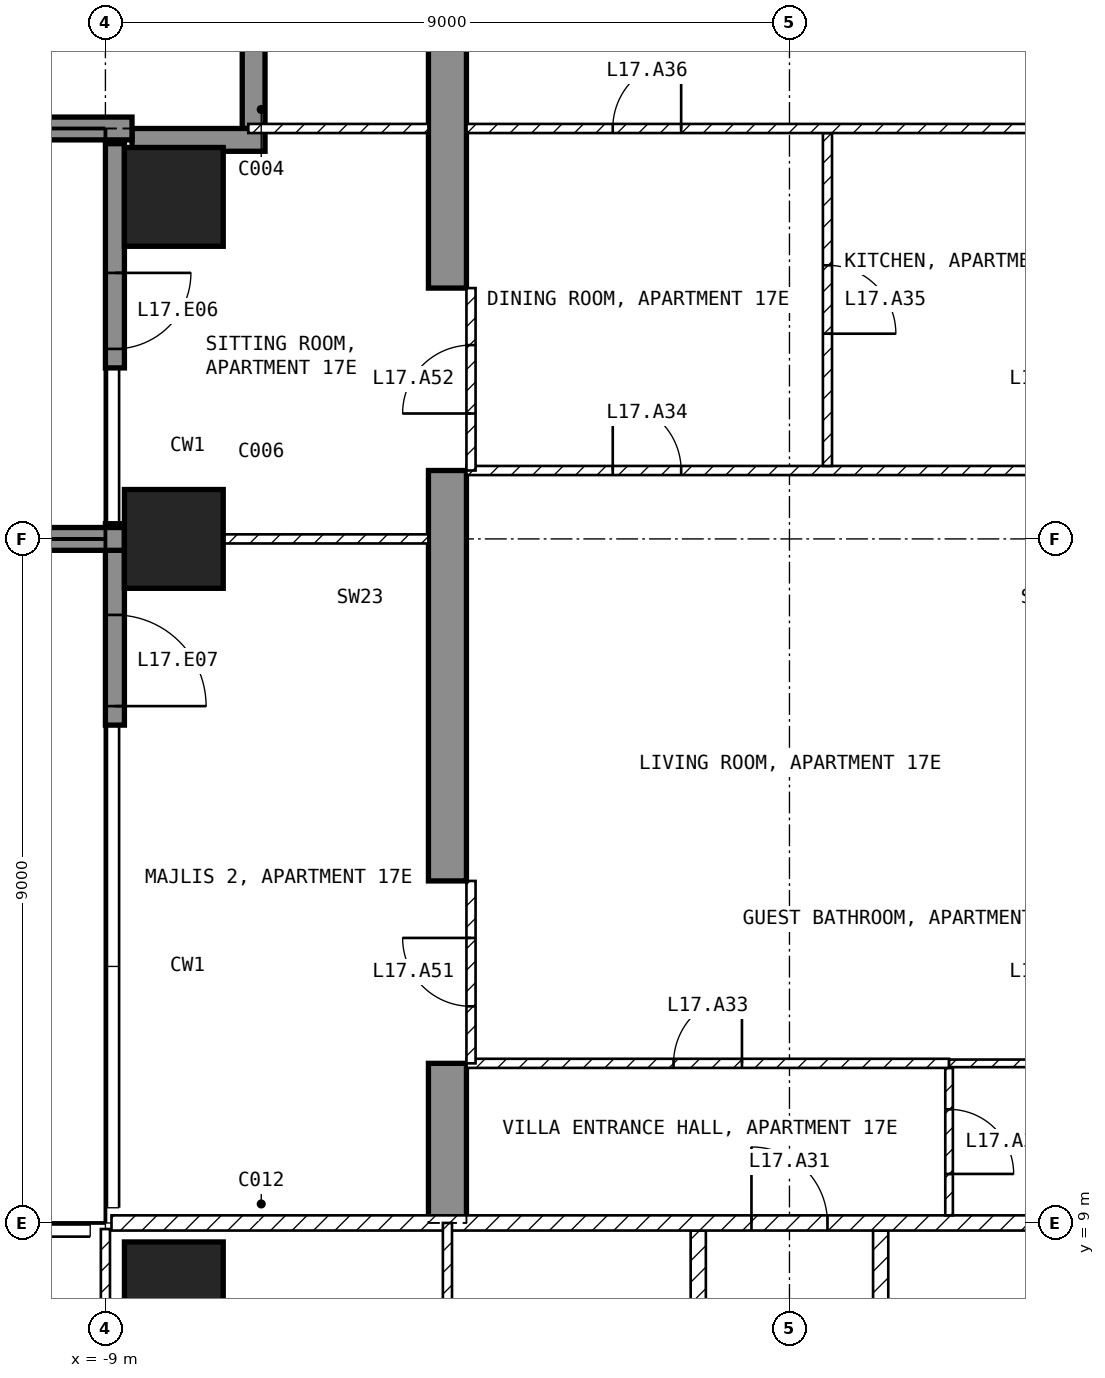
"""IFC4 building model, lengths in metres.
Left out: names, types, materials, properties, quantities, classifications, styles, units other than length and angle.
Written with IfcOpenShell. Run it as: python <this file> out.ifc"""

import sys

from ifc_helpers import new_model, si_unit, direction, frame, frame_2d, origin, origin_2d, place, context, subcontext, project, spatial, polyline, rectangle, outline, extrude, element, fill, save


model = new_model("IFC4")
c1 = context("Model", 3, precision=1e-05, world=origin(), true_north=direction((0.0, 1.0)))
c2 = subcontext(c1, "Body", "Model", "MODEL_VIEW")
j1 = project(units=[si_unit("LENGTHUNIT", "METRE"), si_unit("PLANEANGLEUNIT", "RADIAN")], contexts=[c1])
p1 = place(None, origin())
s1 = spatial("IfcSite", under=j1, at=p1, CompositionType="ELEMENT")
p2 = place(p1, origin())
s2 = spatial("IfcBuilding", under=s1, at=p2, CompositionType="ELEMENT")
p3 = place(p2, frame((0.0, 0.0, 78.5)))
s3 = spatial("IfcBuildingStorey", under=s2, at=p3, CompositionType="ELEMENT", Elevation=78.5)
for number, where, z_axis, x_axis in (
    (1, (-8.1, 8.1, -0.25), (0.0, 0.0, 1.0), (1.0, 0.0, 0.0)),
    (2, (-8.1, 18.0, -0.25), (0.0, 0.0, 1.0), (1.0, 0.0, 0.0)),
    (3, (-8.1, 22.5, -0.25), (0.0, 0.0, 1.0), (1.0, 0.0, 0.0)),
):
    element("IfcColumn", number, at=place(p3, frame(where, z_axis=z_axis, x_axis=x_axis)), inside=s3, PredefinedType="COLUMN", context=c2, shape_type="SweptSolid", body=[
        extrude(rectangle(XDim=1.3, YDim=1.3, at=origin_2d()), origin(), (0.0, 0.0, 1.0), 3.5),
    ])
p4 = place(p3, frame((-4.75, 9.0, -0.25), z_axis=(1.0, 0.0, 0.0), x_axis=(0.0, 1.0, 0.0)))
e4 = element("IfcWall", 4, at=p4, inside=s3, PredefinedType="SHEAR", context=c2, shape_type="SweptSolid", body=[
    extrude(outline(polyline([(0.0, 0.0), (2.1, 0.0), (2.1, 2.65), (4.5, 2.65), (4.5, 0.0), (9.9, 0.0), (9.9, 2.65), (12.3, 2.65), (12.3, 0.0), (16.45, 0.0), (16.45, 3.5), (0.0, 3.5), (0.0, 0.0)])), origin(), (0.0, 0.0, 1.0), 0.5),
])
p5 = place(p3, frame((-8.875, 23.2, 0.0), z_axis=(0.0, 0.0, 1.0), x_axis=(0.0, -1.0, 0.0)))
e5 = element("IfcWall", 5, at=p5, inside=s3, PredefinedType="SOLIDWALL", context=c2, shape_type="SweptSolid", body=[
    extrude(rectangle(XDim=2.95, YDim=0.25, at=frame_2d((1.475, 0.0))), origin(), (0.0, 0.0, 1.0), 3.25),
])
p6 = place(p5, frame((1.7, 0.0, 0.0)))
e6 = element("IfcOpeningElement", 6, at=p6, cuts=e5, PredefinedType="OPENING", context=c2, shape_type="SweptSolid", body=[
    extrude(rectangle(XDim=1.0, YDim=2.4, at=frame_2d((0.5, 1.2))), frame((0.0, 0.135, 0.0), z_axis=(0.0, -1.0, 0.0), x_axis=(1.0, 0.0, 0.0)), (0.0, 0.0, 1.0), 0.27),
])
p7 = place(p3, frame((-8.875, 18.2, 0.0), z_axis=(0.0, 0.0, 1.0), x_axis=(0.0, -1.0, 0.0)))
e7 = element("IfcWall", 7, at=p7, inside=s3, PredefinedType="SOLIDWALL", context=c2, shape_type="SweptSolid", body=[
    extrude(rectangle(XDim=2.65, YDim=0.25, at=frame_2d((1.325, 0.0))), origin(), (0.0, 0.0, 1.0), 3.25),
])
p8 = place(p7, frame((1.2, 0.0, 0.0)))
e8 = element("IfcOpeningElement", 8, at=p8, cuts=e7, PredefinedType="OPENING", context=c2, shape_type="SweptSolid", body=[
    extrude(rectangle(XDim=1.2, YDim=2.4, at=frame_2d((0.6, 1.2))), frame((0.0, 0.135, 0.0), z_axis=(0.0, -1.0, 0.0), x_axis=(1.0, 0.0, 0.0)), (0.0, 0.0, 1.0), 0.27),
])
p9 = place(p3, frame((-7.05, 25.2, 0.0), z_axis=(0.0, 0.0, 1.0), x_axis=(0.0, -1.0, 0.0)))
e9 = element("IfcWall", 9, at=p9, inside=s3, PredefinedType="SOLIDWALL", context=c2, shape_type="SweptSolid", body=[
    extrude(rectangle(XDim=1.8, YDim=0.3, at=frame_2d((0.9, 0.0))), origin(), (0.0, 0.0, 1.0), 3.25),
])
p10 = place(p3, frame((-6.9, 23.25, 0.0), z_axis=(0.0, 0.0, 1.0), x_axis=(-1.0, 0.0, 0.0)))
e10 = element("IfcWall", 10, at=p10, inside=s3, PredefinedType="SOLIDWALL", context=c2, shape_type="SweptSolid", body=[
    extrude(rectangle(XDim=1.75, YDim=0.3, at=frame_2d((0.875, 0.0))), origin(), (0.0, 0.0, 1.0), 3.25),
])
p11 = place(p3, frame((-8.75, 18.0, 0.0), z_axis=(0.0, 0.0, 1.0), x_axis=(-1.0, 0.0, 0.0)))
e11 = element("IfcWall", 11, at=p11, inside=s3, PredefinedType="SOLIDWALL", context=c2, shape_type="SweptSolid", body=[
    extrude(rectangle(XDim=2.95, YDim=0.3, at=frame_2d((1.475, 0.0))), origin(), (0.0, 0.0, 1.0), 3.25),
])
p12 = place(p3, frame((-8.65, 23.4, 0.0), z_axis=(0.0, 0.0, 1.0), x_axis=(-1.0, 0.0, 0.0)))
e12 = element("IfcWall", 12, at=p12, inside=s3, PredefinedType="SOLIDWALL", context=c2, shape_type="SweptSolid", body=[
    extrude(rectangle(XDim=3.05, YDim=0.3, at=frame_2d((1.525, 0.0))), origin(), (0.0, 0.0, 1.0), 3.25),
])
for number, where, z_axis, x_axis in (
    (13, (1.2, 8.9, 0.0), (0.0, 0.0, 1.0), (0.0, -1.0, 0.0)),
    (14, (-1.2, 1.3, 0.0), (0.0, 0.0, 1.0), (0.0, 1.0, 0.0)),
):
    element("IfcWall", number, at=place(p3, frame(where, z_axis=z_axis, x_axis=x_axis)), inside=s3, PredefinedType="PARTITIONING", context=c2, shape_type="SweptSolid", body=[
        extrude(rectangle(XDim=7.6, YDim=0.2, at=frame_2d((3.8, 0.0))), origin(), (0.0, 0.0, 1.0), 3.25),
    ])
p13 = place(p3, frame((-8.92, 9.0, 0.0), z_axis=(0.0, 0.0, 1.0), x_axis=(1.0, 0.0, 0.0)))
e15 = element("IfcWall", 15, at=p13, inside=s3, PredefinedType="PARTITIONING", context=c2, shape_type="SweptSolid", body=[
    extrude(rectangle(XDim=17.84, YDim=0.2, at=frame_2d((8.92, 0.0))), origin(), (0.0, 0.0, 1.0), 3.25),
])
p14 = place(p13, frame((8.42, 0.0, 0.0)))
e16 = element("IfcOpeningElement", 16, at=p14, cuts=e15, PredefinedType="OPENING", context=c2, shape_type="SweptSolid", body=[
    extrude(rectangle(XDim=1.0, YDim=2.1, at=frame_2d((0.5, 1.05))), frame((0.0, 0.11, 0.0), z_axis=(0.0, -1.0, 0.0), x_axis=(1.0, 0.0, 0.0)), (0.0, 0.0, 1.0), 0.22),
])
p15 = place(p3, frame((-9.0, 8.92, 0.0), z_axis=(0.0, 0.0, 1.0), x_axis=(0.0, -1.0, 0.0)))
e17 = element("IfcWall", 17, at=p15, inside=s3, PredefinedType="PARTITIONING", context=c2, shape_type="SweptSolid", body=[
    extrude(rectangle(XDim=7.62, YDim=0.12, at=frame_2d((3.81, 0.0))), origin(), (0.0, 0.0, 1.0), 3.25),
])
p16 = place(p15, frame((2.67, 0.0, 0.0)))
e18 = element("IfcOpeningElement", 18, at=p16, cuts=e17, PredefinedType="OPENING", context=c2, shape_type="SweptSolid", body=[
    extrude(rectangle(XDim=0.9, YDim=2.1, at=frame_2d((0.45, 1.05))), frame((0.0, 0.07, 0.0), z_axis=(0.0, -1.0, 0.0), x_axis=(1.0, 0.0, 0.0)), (0.0, 0.0, 1.0), 0.14),
])
p17 = place(p3, frame((-4.5, 9.0, 0.0), z_axis=(0.0, 0.0, 1.0), x_axis=(0.0, -1.0, 0.0)))
e19 = element("IfcWall", 19, at=p17, inside=s3, PredefinedType="PARTITIONING", context=c2, shape_type="SweptSolid", body=[
    extrude(rectangle(XDim=7.7, YDim=0.12, at=frame_2d((3.85, 0.0))), origin(), (0.0, 0.0, 1.0), 3.25),
])
p18 = place(p17, frame((3.4, 0.0, 0.0)))
e20 = element("IfcOpeningElement", 20, at=p18, cuts=e19, PredefinedType="OPENING", context=c2, shape_type="SweptSolid", body=[
    extrude(rectangle(XDim=0.9, YDim=2.1, at=frame_2d((0.45, 1.05))), frame((0.0, 0.07, 0.0), z_axis=(0.0, -1.0, 0.0), x_axis=(1.0, 0.0, 0.0)), (0.0, 0.0, 1.0), 0.14),
])
p19 = place(p3, frame((2.1, 11.04, 0.0), z_axis=(0.0, 0.0, 1.0), x_axis=(0.0, -1.0, 0.0)))
e21 = element("IfcWall", 21, at=p19, inside=s3, PredefinedType="PARTITIONING", context=c2, shape_type="SweptSolid", body=[
    extrude(rectangle(XDim=1.94, YDim=0.1, at=frame_2d((0.97, 0.0))), origin(), (0.0, 0.0, 1.0), 3.25),
])
p20 = place(p19, frame((0.545, 0.0, 0.0)))
e22 = element("IfcOpeningElement", 22, at=p20, cuts=e21, PredefinedType="OPENING", context=c2, shape_type="SweptSolid", body=[
    extrude(rectangle(XDim=0.85, YDim=2.1, at=frame_2d((0.425, 1.05))), frame((0.0, 0.06, 0.0), z_axis=(0.0, -1.0, 0.0), x_axis=(1.0, 0.0, 0.0)), (0.0, 0.0, 1.0), 0.12),
])
p21 = place(p3, frame((-4.25, 11.1, 0.0), z_axis=(0.0, 0.0, 1.0), x_axis=(1.0, 0.0, 0.0)))
e23 = element("IfcWall", 23, at=p21, inside=s3, PredefinedType="PARTITIONING", context=c2, shape_type="SweptSolid", body=[
    extrude(rectangle(XDim=6.35, YDim=0.12, at=frame_2d((3.175, 0.0))), origin(), (0.0, 0.0, 1.0), 3.25),
])
p22 = place(p21, frame((2.725, 0.0, 0.0)))
e24 = element("IfcOpeningElement", 24, at=p22, cuts=e23, PredefinedType="OPENING", context=c2, shape_type="SweptSolid", body=[
    extrude(rectangle(XDim=0.9, YDim=2.1, at=frame_2d((0.45, 1.05))), frame((0.0, 0.07, 0.0), z_axis=(0.0, -1.0, 0.0), x_axis=(1.0, 0.0, 0.0)), (0.0, 0.0, 1.0), 0.14),
])
p23 = place(p3, frame((2.1, 11.1, 0.0), z_axis=(0.0, 0.0, 1.0), x_axis=(1.0, 0.0, 0.0)))
e25 = element("IfcWall", 25, at=p23, inside=s3, PredefinedType="PARTITIONING", context=c2, shape_type="SweptSolid", body=[
    extrude(rectangle(XDim=2.15, YDim=0.1, at=frame_2d((1.075, 0.0))), origin(), (0.0, 0.0, 1.0), 3.25),
])
p24 = place(p3, frame((-4.25, 18.9, 0.0), z_axis=(0.0, 0.0, 1.0), x_axis=(1.0, 0.0, 0.0)))
e26 = element("IfcWall", 26, at=p24, inside=s3, PredefinedType="PARTITIONING", context=c2, shape_type="SweptSolid", body=[
    extrude(rectangle(XDim=8.5, YDim=0.12, at=frame_2d((4.25, 0.0))), origin(), (0.0, 0.0, 1.0), 3.25),
])
p25 = place(p24, frame((1.925, 0.0, 0.0)))
e27 = element("IfcOpeningElement", 27, at=p25, cuts=e26, PredefinedType="OPENING", context=c2, shape_type="SweptSolid", body=[
    extrude(rectangle(XDim=0.9, YDim=2.1, at=frame_2d((0.45, 1.05))), frame((0.0, 0.07, 0.0), z_axis=(0.0, -1.0, 0.0), x_axis=(1.0, 0.0, 0.0)), (0.0, 0.0, 1.0), 0.14),
])
p26 = place(p3, frame((0.5, 23.34, 0.0), z_axis=(0.0, 0.0, 1.0), x_axis=(0.0, -1.0, 0.0)))
e28 = element("IfcWall", 28, at=p26, inside=s3, PredefinedType="PARTITIONING", context=c2, shape_type="SweptSolid", body=[
    extrude(rectangle(XDim=4.38, YDim=0.12, at=frame_2d((2.19, 0.0))), origin(), (0.0, 0.0, 1.0), 3.25),
])
p27 = place(p26, frame((1.74, 0.0, 0.0)))
e29 = element("IfcOpeningElement", 29, at=p27, cuts=e28, PredefinedType="OPENING", context=c2, shape_type="SweptSolid", body=[
    extrude(rectangle(XDim=0.9, YDim=2.1, at=frame_2d((0.45, 1.05))), frame((0.0, 0.07, 0.0), z_axis=(0.0, -1.0, 0.0), x_axis=(1.0, 0.0, 0.0)), (0.0, 0.0, 1.0), 0.14),
])
p28 = place(p3, frame((-4.25, 23.4, 0.0), z_axis=(0.0, 0.0, 1.0), x_axis=(1.0, 0.0, 0.0)))
e30 = element("IfcWall", 30, at=p28, inside=s3, PredefinedType="PARTITIONING", context=c2, shape_type="SweptSolid", body=[
    extrude(rectangle(XDim=8.5, YDim=0.12, at=frame_2d((4.25, 0.0))), origin(), (0.0, 0.0, 1.0), 3.25),
])
p29 = place(p28, frame((1.925, 0.0, 0.0)))
e31 = element("IfcOpeningElement", 31, at=p29, cuts=e30, PredefinedType="OPENING", context=c2, shape_type="SweptSolid", body=[
    extrude(rectangle(XDim=0.9, YDim=2.1, at=frame_2d((0.45, 1.05))), frame((0.0, 0.07, 0.0), z_axis=(0.0, -1.0, 0.0), x_axis=(1.0, 0.0, 0.0)), (0.0, 0.0, 1.0), 0.14),
])
p30 = place(p3, frame((-7.45, 18.0, 0.0), z_axis=(0.0, 0.0, 1.0), x_axis=(1.0, 0.0, 0.0)))
e32 = element("IfcWall", 32, at=p30, inside=s3, PredefinedType="PARTITIONING", context=c2, shape_type="SweptSolid", body=[
    extrude(rectangle(XDim=2.7, YDim=0.12, at=frame_2d((1.35, 0.0))), origin(), (0.0, 0.0, 1.0), 2.346),
])
p31 = place(p3, frame((-7.12, 23.4, 0.0), z_axis=(0.0, 0.0, 1.0), x_axis=(1.0, 0.0, 0.0)))
e33 = element("IfcWall", 33, at=p31, inside=s3, PredefinedType="PARTITIONING", context=c2, shape_type="SweptSolid", body=[
    extrude(rectangle(XDim=2.37, YDim=0.12, at=frame_2d((1.185, 0.0))), origin(), (0.0, 0.0, 1.0), 3.25),
])
p32 = place(p3, frame((-4.19, 11.1, 0.0), z_axis=(0.0, 0.0, 1.0), x_axis=(0.0, 1.0, 0.0)))
e34 = element("IfcWall", 34, at=p32, inside=s3, PredefinedType="PARTITIONING", context=c2, shape_type="SweptSolid", body=[
    extrude(rectangle(XDim=2.4, YDim=0.12, at=frame_2d((1.2, 0.0))), origin(), (0.0, 0.0, 1.0), 2.4),
])
p33 = place(p32, frame((0.75, 0.0, 0.0)))
e35 = element("IfcOpeningElement", 35, at=p33, cuts=e34, PredefinedType="OPENING", context=c2, shape_type="SweptSolid", body=[
    extrude(rectangle(XDim=0.9, YDim=2.1, at=frame_2d((0.45, 1.05))), frame((0.0, 0.07, 0.0), z_axis=(0.0, -1.0, 0.0), x_axis=(1.0, 0.0, 0.0)), (0.0, 0.0, 1.0), 0.14),
])
p34 = place(p3, frame((-4.19, 18.9, 0.0), z_axis=(0.0, 0.0, 1.0), x_axis=(0.0, 1.0, 0.0)))
e36 = element("IfcWall", 36, at=p34, inside=s3, PredefinedType="PARTITIONING", context=c2, shape_type="SweptSolid", body=[
    extrude(rectangle(XDim=2.4, YDim=0.12, at=frame_2d((1.2, 0.0))), origin(), (0.0, 0.0, 1.0), 2.4),
])
p35 = place(p34, frame((0.75, 0.0, 0.0)))
e37 = element("IfcOpeningElement", 37, at=p35, cuts=e36, PredefinedType="OPENING", context=c2, shape_type="SweptSolid", body=[
    extrude(rectangle(XDim=0.9, YDim=2.1, at=frame_2d((0.45, 1.05))), frame((0.0, 0.07, 0.0), z_axis=(0.0, -1.0, 0.0), x_axis=(1.0, 0.0, 0.0)), (0.0, 0.0, 1.0), 0.14),
])
p36 = place(p6, origin())
e38 = element("IfcDoor", 38, at=p36, inside=s3, OperationType="SINGLE_SWING_LEFT", PredefinedType="DOOR", context=c2, shape_type="SweptSolid", body=[
    extrude(rectangle(XDim=1.0, YDim=2.4, at=frame_2d((0.5, 1.2))), frame((0.0, 0.025, 0.0), z_axis=(0.0, -1.0, 0.0), x_axis=(1.0, 0.0, 0.0)), (0.0, 0.0, 1.0), 0.05),
])
fill(e6, e38)
p37 = place(p8, origin())
e39 = element("IfcDoor", 39, at=p37, inside=s3, OperationType="SINGLE_SWING_RIGHT", PredefinedType="DOOR", context=c2, shape_type="SweptSolid", body=[
    extrude(rectangle(XDim=1.2, YDim=2.4, at=frame_2d((0.6, 1.2))), frame((0.0, 0.025, 0.0), z_axis=(0.0, -1.0, 0.0), x_axis=(1.0, 0.0, 0.0)), (0.0, 0.0, 1.0), 0.05),
])
fill(e8, e39)
p38 = place(p14, origin())
e40 = element("IfcDoor", 40, at=p38, inside=s3, OperationType="SINGLE_SWING_LEFT", PredefinedType="DOOR", context=c2, shape_type="SweptSolid", body=[
    extrude(rectangle(XDim=1.0, YDim=2.1, at=frame_2d((0.5, 1.05))), frame((0.0, 0.025, 0.0), z_axis=(0.0, -1.0, 0.0), x_axis=(1.0, 0.0, 0.0)), (0.0, 0.0, 1.0), 0.05),
])
fill(e16, e40)
p39 = place(p20, origin())
e41 = element("IfcDoor", 41, at=p39, inside=s3, OperationType="SINGLE_SWING_RIGHT", PredefinedType="DOOR", context=c2, shape_type="SweptSolid", body=[
    extrude(rectangle(XDim=0.85, YDim=2.1, at=frame_2d((0.425, 1.05))), frame((0.0, 0.025, 0.0), z_axis=(0.0, -1.0, 0.0), x_axis=(1.0, 0.0, 0.0)), (0.0, 0.0, 1.0), 0.05),
])
fill(e22, e41)
p40 = place(p22, origin())
e42 = element("IfcDoor", 42, at=p40, inside=s3, OperationType="SINGLE_SWING_RIGHT", PredefinedType="DOOR", context=c2, shape_type="SweptSolid", body=[
    extrude(rectangle(XDim=0.9, YDim=2.1, at=frame_2d((0.45, 1.05))), frame((0.0, 0.025, 0.0), z_axis=(0.0, -1.0, 0.0), x_axis=(1.0, 0.0, 0.0)), (0.0, 0.0, 1.0), 0.05),
])
fill(e24, e42)
p41 = place(p25, origin())
e43 = element("IfcDoor", 43, at=p41, inside=s3, OperationType="SINGLE_SWING_LEFT", PredefinedType="DOOR", context=c2, shape_type="SweptSolid", body=[
    extrude(rectangle(XDim=0.9, YDim=2.1, at=frame_2d((0.45, 1.05))), frame((0.0, 0.025, 0.0), z_axis=(0.0, -1.0, 0.0), x_axis=(1.0, 0.0, 0.0)), (0.0, 0.0, 1.0), 0.05),
])
fill(e27, e43)
p42 = place(p27, origin())
e44 = element("IfcDoor", 44, at=p42, inside=s3, OperationType="SINGLE_SWING_RIGHT", PredefinedType="DOOR", context=c2, shape_type="SweptSolid", body=[
    extrude(rectangle(XDim=0.9, YDim=2.1, at=frame_2d((0.45, 1.05))), frame((0.0, 0.025, 0.0), z_axis=(0.0, -1.0, 0.0), x_axis=(1.0, 0.0, 0.0)), (0.0, 0.0, 1.0), 0.05),
])
fill(e29, e44)
p43 = place(p29, origin())
e45 = element("IfcDoor", 45, at=p43, inside=s3, OperationType="SINGLE_SWING_RIGHT", PredefinedType="DOOR", context=c2, shape_type="SweptSolid", body=[
    extrude(rectangle(XDim=0.9, YDim=2.1, at=frame_2d((0.45, 1.05))), frame((0.0, 0.025, 0.0), z_axis=(0.0, -1.0, 0.0), x_axis=(1.0, 0.0, 0.0)), (0.0, 0.0, 1.0), 0.05),
])
fill(e31, e45)
p44 = place(p33, origin())
e46 = element("IfcDoor", 46, at=p44, inside=s3, OperationType="SINGLE_SWING_RIGHT", PredefinedType="DOOR", context=c2, shape_type="SweptSolid", body=[
    extrude(rectangle(XDim=0.9, YDim=2.1, at=frame_2d((0.45, 1.05))), frame((0.0, 0.025, 0.0), z_axis=(0.0, -1.0, 0.0), x_axis=(1.0, 0.0, 0.0)), (0.0, 0.0, 1.0), 0.05),
])
fill(e35, e46)
p45 = place(p35, origin())
e47 = element("IfcDoor", 47, at=p45, inside=s3, OperationType="SINGLE_SWING_LEFT", PredefinedType="DOOR", context=c2, shape_type="SweptSolid", body=[
    extrude(rectangle(XDim=0.9, YDim=2.1, at=frame_2d((0.45, 1.05))), frame((0.0, 0.025, 0.0), z_axis=(0.0, -1.0, 0.0), x_axis=(1.0, 0.0, 0.0)), (0.0, 0.0, 1.0), 0.05),
])
fill(e37, e47)
save(model, sys.argv[1])
